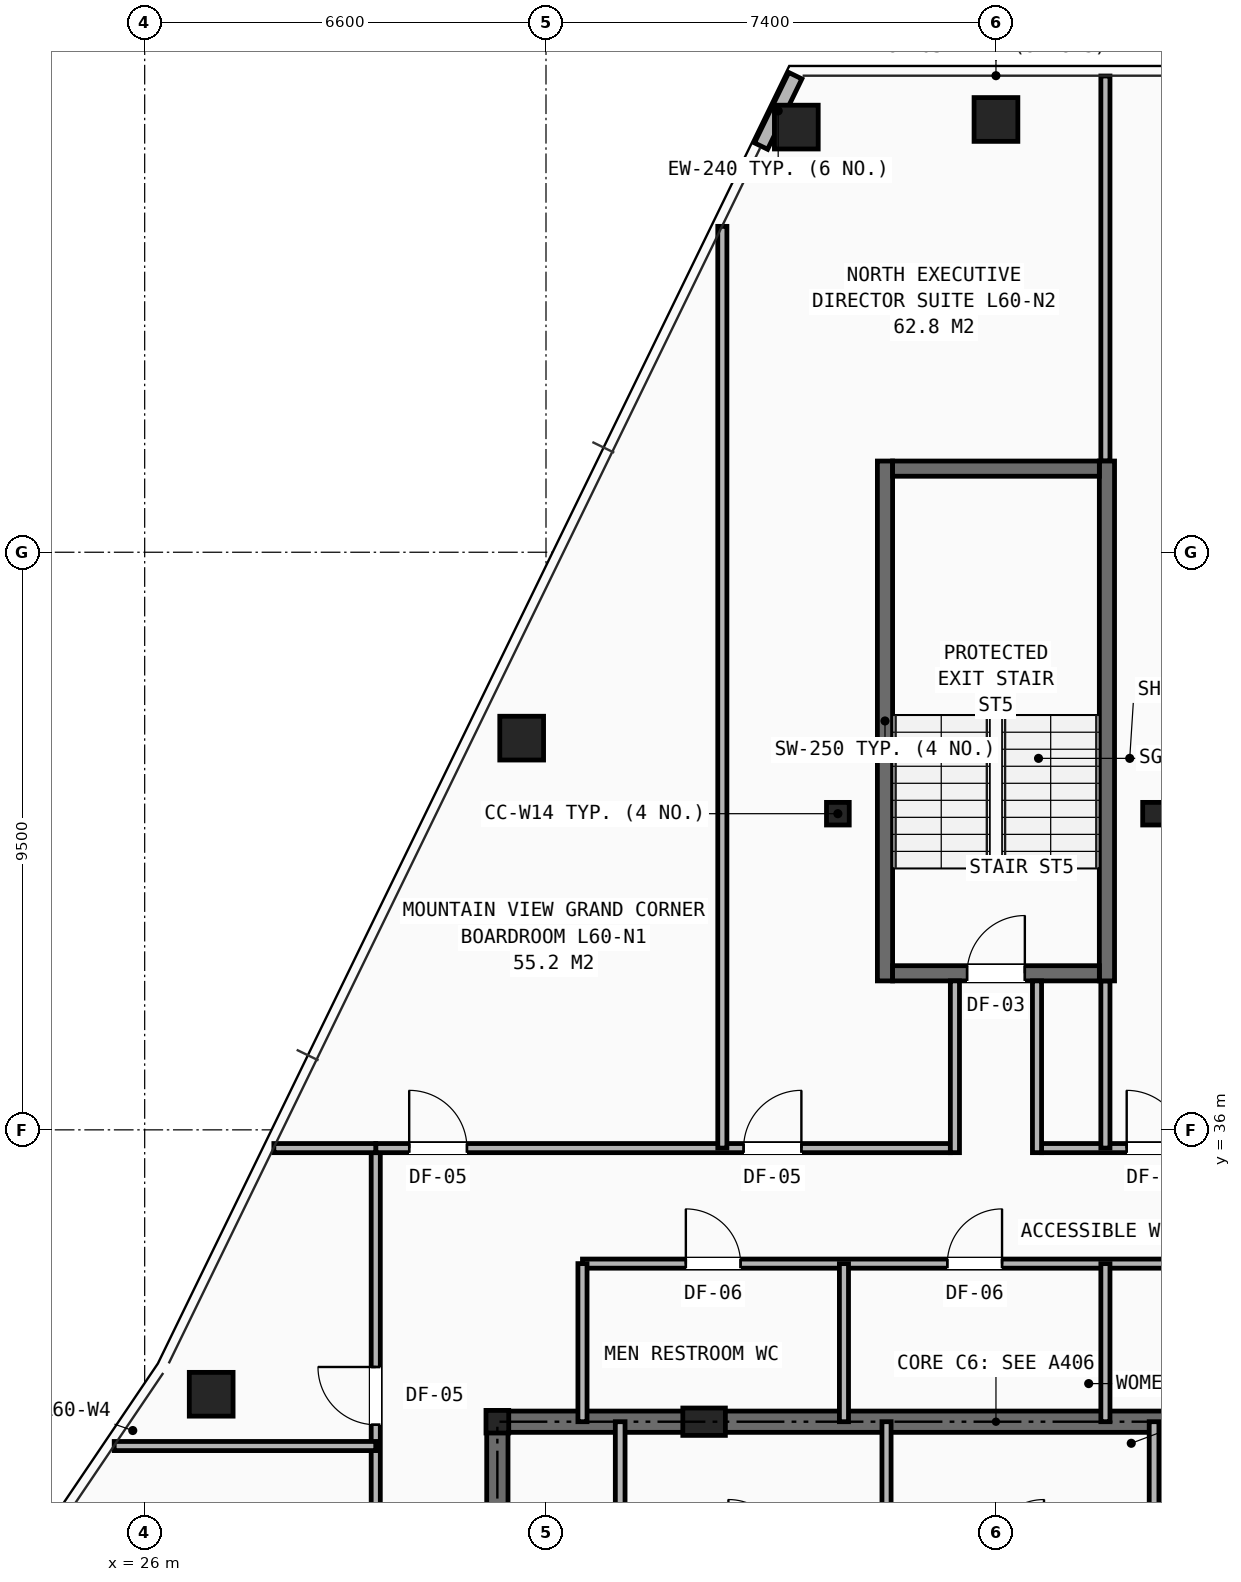
"""IFC4 building model, lengths in metres.
Left out: names, types, materials, properties, quantities, classifications, styles, units other than length and angle.
Written with IfcOpenShell. Run it as: python <this file> out.ifc"""

import sys

from ifc_helpers import new_model, si_unit, direction, frame, frame_2d, origin, origin_2d, place, context, subcontext, project, spatial, rectangle, hollow_rectangle, i_section, extrude, element, fill, save


model = new_model("IFC4")
c1 = context("Model", 3, precision=1e-05, world=origin(), true_north=direction((0.0, 1.0)))
c2 = subcontext(c1, "Body", "Model", "MODEL_VIEW")
j1 = project(units=[si_unit("LENGTHUNIT", "METRE"), si_unit("PLANEANGLEUNIT", "RADIAN")], contexts=[c1])
p1 = place(None, origin())
s1 = spatial("IfcSite", under=j1, at=p1, CompositionType="ELEMENT")
p2 = place(p1, origin())
s2 = spatial("IfcBuilding", under=s1, at=p2, CompositionType="ELEMENT")
p3 = place(p2, frame((0.0, 0.0, 211.9)))
s3 = spatial("IfcBuildingStorey", under=s2, at=p3, CompositionType="ELEMENT", Elevation=211.9)
for number, where, z_axis, x_axis in (
    (1, (31.8, 31.2, 0.0), (0.0, 0.0, 1.0), (1.0, 0.0, 0.0)),
    (2, (37.4, 41.2, 0.0), (0.0, 0.0, 1.0), (1.0, 0.0, 0.0)),
    (3, (42.6, 41.2, 0.0), (0.0, 0.0, 1.0), (1.0, 0.0, 0.0)),
):
    element("IfcColumn", number, at=place(p3, frame(where, z_axis=z_axis, x_axis=x_axis)), inside=s3, PredefinedType="COLUMN", context=c2, shape_type="SweptSolid", body=[
        extrude(i_section(OverallWidth=0.374, OverallDepth=0.372, WebThickness=0.016, FlangeThickness=0.026, at=origin_2d()), origin(), (0.0, 0.0, 1.0), 3.5),
    ])
p4 = place(p3, frame((35.2, 31.2, 0.0), z_axis=(0.0, 0.0, 1.0), x_axis=(1.0, 0.0, 0.0)))
e4 = element("IfcColumn", 4, at=p4, inside=s3, PredefinedType="PILASTER", context=c2, shape_type="SweptSolid", body=[
    extrude(rectangle(XDim=0.7, YDim=0.45, at=origin_2d()), origin(), (0.0, 0.0, 1.0), 3.5),
])
for number, where, z_axis, x_axis in (
    (5, (40.0, 52.618, 0.0), (0.0, 0.0, 1.0), (1.0, 0.0, 0.0)),
    (6, (36.717, 52.492, 0.0), (0.0, 0.0, 1.0), (1.0, 0.0, 0.0)),
    (7, (32.2, 42.443, 0.0), (0.0, 0.0, 1.0), (1.0, 0.0, 0.0)),
    (8, (27.094, 31.652, 0.0), (0.0, 0.0, 1.0), (1.0, 0.0, 0.0)),
):
    element("IfcColumn", number, at=place(p3, frame(where, z_axis=z_axis, x_axis=x_axis)), inside=s3, PredefinedType="COLUMN", context=c2, shape_type="SweptSolid", body=[
        extrude(hollow_rectangle(XDim=0.72, YDim=0.72, WallThickness=0.05, at=origin_2d()), origin(), (0.0, 0.0, 1.0), 3.5),
    ])
p5 = place(p3, frame((36.7, 53.338, 0.0), z_axis=(0.0, 0.0, 1.0), x_axis=(-0.43755686859, -0.899190739915, 0.0)))
e9 = element("IfcWall", 9, at=p5, inside=s3, PredefinedType="SHEAR", context=c2, shape_type="SweptSolid", body=[
    extrude(rectangle(XDim=1.288, YDim=0.24, at=frame_2d((0.644, 0.0))), origin(), (0.0, 0.0, 1.0), 2.623),
])
p6 = place(p3, frame((31.8, 31.2, 0.0), z_axis=(0.0, 0.0, 1.0), x_axis=(1.0, 0.0, 0.0)))
e10 = element("IfcWall", 10, at=p6, inside=s3, PredefinedType="SHEAR", context=c2, shape_type="SweptSolid", body=[
    extrude(rectangle(XDim=16.4, YDim=0.35, at=frame_2d((8.2, 0.0))), origin(), (0.0, 0.0, 1.0), 3.25),
])
p7 = place(p3, frame((31.8, 16.4, 0.0), z_axis=(0.0, 0.0, 1.0), x_axis=(0.0, 1.0, 0.0)))
e11 = element("IfcWall", 11, at=p7, inside=s3, PredefinedType="SHEAR", context=c2, shape_type="SweptSolid", body=[
    extrude(rectangle(XDim=14.8, YDim=0.35, at=frame_2d((7.4, 0.0))), origin(), (0.0, 0.0, 1.0), 3.25),
])
p8 = place(p7, frame((11.0, 0.0, 0.0)))
e12 = element("IfcOpeningElement", 12, at=p8, cuts=e11, PredefinedType="OPENING", context=c2, shape_type="SweptSolid", body=[
    extrude(rectangle(XDim=1.1, YDim=2.15, at=frame_2d((0.55, 1.075))), frame((0.0, 0.185, 0.0), z_axis=(0.0, -1.0, 0.0), x_axis=(1.0, 0.0, 0.0)), (0.0, 0.0, 1.0), 0.37),
])
p9 = place(p3, frame((33.82, 29.02, 0.0), z_axis=(0.0, 0.0, 1.0), x_axis=(0.0, 1.0, 0.0)))
e13 = element("IfcWall", 13, at=p9, inside=s3, PredefinedType="SOLIDWALL", context=c2, shape_type="SweptSolid", body=[
    extrude(rectangle(XDim=2.18, YDim=0.16, at=frame_2d((1.09, 0.0))), origin(), (0.0, 0.0, 1.0), 2.978),
])
p10 = place(p3, frame((38.2, 29.02, 0.0), z_axis=(0.0, 0.0, 1.0), x_axis=(0.0, 1.0, 0.0)))
e14 = element("IfcWall", 14, at=p10, inside=s3, PredefinedType="PARTITIONING", context=c2, shape_type="SweptSolid", body=[
    extrude(rectangle(XDim=2.18, YDim=0.15, at=frame_2d((1.09, 0.0))), origin(), (0.0, 0.0, 1.0), 2.978),
])
p11 = place(p3, frame((42.6, 29.02, 0.0), z_axis=(0.0, 0.0, 1.0), x_axis=(0.0, 1.0, 0.0)))
e15 = element("IfcWall", 15, at=p11, inside=s3, PredefinedType="SOLIDWALL", context=c2, shape_type="SweptSolid", body=[
    extrude(rectangle(XDim=2.18, YDim=0.16, at=frame_2d((1.09, 0.0))), origin(), (0.0, 0.0, 1.0), 2.978),
])
p12 = place(p3, frame((33.2, 33.8, 0.0), z_axis=(0.0, 0.0, 1.0), x_axis=(1.0, 0.0, 0.0)))
e16 = element("IfcWall", 16, at=p12, inside=s3, PredefinedType="PARTITIONING", context=c2, shape_type="SweptSolid", body=[
    extrude(rectangle(XDim=13.0, YDim=0.15, at=frame_2d((6.5, 0.0))), origin(), (0.0, 0.0, 1.0), 3.25),
])
p13 = place(p12, frame((1.7, 0.0, 0.0)))
e17 = element("IfcOpeningElement", 17, at=p13, cuts=e16, PredefinedType="OPENING", context=c2, shape_type="SweptSolid", body=[
    extrude(rectangle(XDim=0.9, YDim=2.1, at=frame_2d((0.45, 1.05))), frame((0.0, 0.085, 0.0), z_axis=(0.0, -1.0, 0.0), x_axis=(1.0, 0.0, 0.0)), (0.0, 0.0, 1.0), 0.17),
])
p14 = place(p12, frame((6.0, 0.0, 0.0)))
e18 = element("IfcOpeningElement", 18, at=p14, cuts=e16, PredefinedType="OPENING", context=c2, shape_type="SweptSolid", body=[
    extrude(rectangle(XDim=0.9, YDim=2.1, at=frame_2d((0.45, 1.05))), frame((0.0, 0.085, 0.0), z_axis=(0.0, -1.0, 0.0), x_axis=(1.0, 0.0, 0.0)), (0.0, 0.0, 1.0), 0.17),
])
p15 = place(p12, frame((10.35, 0.0, 0.0)))
e19 = element("IfcOpeningElement", 19, at=p15, cuts=e16, PredefinedType="OPENING", context=c2, shape_type="SweptSolid", body=[
    extrude(rectangle(XDim=0.9, YDim=2.1, at=frame_2d((0.45, 1.05))), frame((0.0, 0.085, 0.0), z_axis=(0.0, -1.0, 0.0), x_axis=(1.0, 0.0, 0.0)), (0.0, 0.0, 1.0), 0.17),
])
for number, where, z_axis, x_axis in (
    (20, (33.2, 31.2, 0.0), (0.0, 0.0, 1.0), (0.0, 1.0, 0.0)),
    (21, (37.5, 31.2, 0.0), (0.0, 0.0, 1.0), (0.0, 1.0, 0.0)),
    (22, (41.8, 31.2, 0.0), (0.0, 0.0, 1.0), (0.0, 1.0, 0.0)),
):
    element("IfcWall", number, at=place(p3, frame(where, z_axis=z_axis, x_axis=x_axis)), inside=s3, PredefinedType="PARTITIONING", context=c2, shape_type="SweptSolid", body=[
        extrude(rectangle(XDim=2.6, YDim=0.15, at=frame_2d((1.3, 0.0))), origin(), (0.0, 0.0, 1.0), 2.978),
    ])
p16 = place(p3, frame((29.8, 16.4, 0.0), z_axis=(0.0, 0.0, 1.0), x_axis=(0.0, 1.0, 0.0)))
e23 = element("IfcWall", 23, at=p16, inside=s3, PredefinedType="PARTITIONING", context=c2, shape_type="SweptSolid", body=[
    extrude(rectangle(XDim=19.3, YDim=0.15, at=frame_2d((9.65, 0.0))), origin(), (0.0, 0.0, 1.0), 2.265),
])
p17 = place(p16, frame((0.35, 0.0, 0.0)))
e24 = element("IfcOpeningElement", 24, at=p17, cuts=e23, PredefinedType="OPENING", context=c2, shape_type="SweptSolid", body=[
    extrude(rectangle(XDim=0.95, YDim=2.1, at=frame_2d((0.475, 1.05))), frame((0.0, 0.085, 0.0), z_axis=(0.0, -1.0, 0.0), x_axis=(1.0, 0.0, 0.0)), (0.0, 0.0, 1.0), 0.17),
])
p18 = place(p16, frame((4.45, 0.0, 0.0)))
e25 = element("IfcOpeningElement", 25, at=p18, cuts=e23, PredefinedType="OPENING", context=c2, shape_type="SweptSolid", body=[
    extrude(rectangle(XDim=0.95, YDim=2.1, at=frame_2d((0.475, 1.05))), frame((0.0, 0.085, 0.0), z_axis=(0.0, -1.0, 0.0), x_axis=(1.0, 0.0, 0.0)), (0.0, 0.0, 1.0), 0.17),
])
p19 = place(p16, frame((9.45, 0.0, 0.0)))
e26 = element("IfcOpeningElement", 26, at=p19, cuts=e23, PredefinedType="OPENING", context=c2, shape_type="SweptSolid", body=[
    extrude(rectangle(XDim=0.95, YDim=2.1, at=frame_2d((0.475, 1.05))), frame((0.0, 0.085, 0.0), z_axis=(0.0, -1.0, 0.0), x_axis=(1.0, 0.0, 0.0)), (0.0, 0.0, 1.0), 0.17),
])
p20 = place(p16, frame((14.75, 0.0, 0.0)))
e27 = element("IfcOpeningElement", 27, at=p20, cuts=e23, PredefinedType="OPENING", context=c2, shape_type="SweptSolid", body=[
    extrude(rectangle(XDim=0.95, YDim=2.1, at=frame_2d((0.475, 1.05))), frame((0.0, 0.085, 0.0), z_axis=(0.0, -1.0, 0.0), x_axis=(1.0, 0.0, 0.0)), (0.0, 0.0, 1.0), 0.17),
])
p21 = place(p3, frame((29.8, 35.7, 0.0), z_axis=(0.0, 0.0, 1.0), x_axis=(1.0, 0.0, 0.0)))
e28 = element("IfcWall", 28, at=p21, inside=s3, PredefinedType="PARTITIONING", context=c2, shape_type="SweptSolid", body=[
    extrude(rectangle(XDim=9.45, YDim=0.15, at=frame_2d((4.725, 0.0))), origin(), (0.0, 0.0, 1.0), 2.833),
])
p22 = place(p21, frame((0.55, 0.0, 0.0)))
e29 = element("IfcOpeningElement", 29, at=p22, cuts=e28, PredefinedType="OPENING", context=c2, shape_type="SweptSolid", body=[
    extrude(rectangle(XDim=0.95, YDim=2.1, at=frame_2d((0.475, 1.05))), frame((0.0, 0.085, 0.0), z_axis=(0.0, -1.0, 0.0), x_axis=(1.0, 0.0, 0.0)), (0.0, 0.0, 1.0), 0.17),
])
p23 = place(p21, frame((6.05, 0.0, 0.0)))
e30 = element("IfcOpeningElement", 30, at=p23, cuts=e28, PredefinedType="OPENING", context=c2, shape_type="SweptSolid", body=[
    extrude(rectangle(XDim=0.95, YDim=2.1, at=frame_2d((0.475, 1.05))), frame((0.0, 0.085, 0.0), z_axis=(0.0, -1.0, 0.0), x_axis=(1.0, 0.0, 0.0)), (0.0, 0.0, 1.0), 0.17),
])
p24 = place(p3, frame((40.75, 35.7, 0.0), z_axis=(0.0, 0.0, 1.0), x_axis=(1.0, 0.0, 0.0)))
e31 = element("IfcWall", 31, at=p24, inside=s3, PredefinedType="PARTITIONING", context=c2, shape_type="SweptSolid", body=[
    extrude(rectangle(XDim=6.05, YDim=0.15, at=frame_2d((3.025, 0.0))), origin(), (0.0, 0.0, 1.0), 3.25),
])
p25 = place(p24, frame((1.4, 0.0, 0.0)))
e32 = element("IfcOpeningElement", 32, at=p25, cuts=e31, PredefinedType="OPENING", context=c2, shape_type="SweptSolid", body=[
    extrude(rectangle(XDim=0.95, YDim=2.1, at=frame_2d((0.475, 1.05))), frame((0.0, 0.085, 0.0), z_axis=(0.0, -1.0, 0.0), x_axis=(1.0, 0.0, 0.0)), (0.0, 0.0, 1.0), 0.17),
])
p26 = place(p3, frame((28.124, 35.7, 0.0), z_axis=(0.0, 0.0, 1.0), x_axis=(1.0, 0.0, 0.0)))
e33 = element("IfcWall", 33, at=p26, inside=s3, PredefinedType="PARTITIONING", context=c2, shape_type="SweptSolid", body=[
    extrude(rectangle(XDim=1.676, YDim=0.15, at=frame_2d((0.838, 0.0))), origin(), (0.0, 0.0, 1.0), 2.628),
])
p27 = place(p3, frame((25.499, 30.8, 0.0), z_axis=(0.0, 0.0, 1.0), x_axis=(1.0, 0.0, 0.0)))
e34 = element("IfcWall", 34, at=p27, inside=s3, PredefinedType="PARTITIONING", context=c2, shape_type="SweptSolid", body=[
    extrude(rectangle(XDim=4.301, YDim=0.15, at=frame_2d((2.151, 0.0))), origin(), (0.0, 0.0, 1.0), 2.628),
])
p28 = place(p3, frame((35.5, 35.7, 0.0), z_axis=(0.0, 0.0, 1.0), x_axis=(0.0, 1.0, 0.0)))
e35 = element("IfcWall", 35, at=p28, inside=s3, PredefinedType="PARTITIONING", context=c2, shape_type="SweptSolid", body=[
    extrude(rectangle(XDim=15.16, YDim=0.15, at=frame_2d((7.58, 0.0))), origin(), (0.0, 0.0, 1.0), 2.265),
])
p29 = place(p3, frame((41.8, 35.7, 0.0), z_axis=(0.0, 0.0, 1.0), x_axis=(0.0, 1.0, 0.0)))
e36 = element("IfcWall", 36, at=p29, inside=s3, PredefinedType="PARTITIONING", context=c2, shape_type="SweptSolid", body=[
    extrude(rectangle(XDim=2.75, YDim=0.15, at=frame_2d((1.375, 0.0))), origin(), (0.0, 0.0, 1.0), 3.25),
])
p30 = place(p3, frame((41.8, 47.0, 0.0), z_axis=(0.0, 0.0, 1.0), x_axis=(0.0, 1.0, 0.0)))
e37 = element("IfcWall", 37, at=p30, inside=s3, PredefinedType="PARTITIONING", context=c2, shape_type="SweptSolid", body=[
    extrude(rectangle(XDim=6.333, YDim=0.15, at=frame_2d((3.167, 0.0))), origin(), (0.0, 0.0, 1.0), 2.628),
])
for number, where, z_axis, x_axis in (
    (38, (38.175, 38.45, 0.0), (0.0, 0.0, 1.0), (0.0, 1.0, 0.0)),
    (39, (41.825, 38.45, 0.0), (0.0, 0.0, 1.0), (0.0, 1.0, 0.0)),
):
    element("IfcWall", number, at=place(p3, frame(where, z_axis=z_axis, x_axis=x_axis)), inside=s3, PredefinedType="SHEAR", context=c2, shape_type="SweptSolid", body=[
        extrude(rectangle(XDim=8.55, YDim=0.25, at=frame_2d((4.275, 0.0))), origin(), (0.0, 0.0, 1.0), 3.25),
    ])
p31 = place(p3, frame((38.3, 38.575, 0.0), z_axis=(0.0, 0.0, 1.0), x_axis=(1.0, 0.0, 0.0)))
e40 = element("IfcWall", 40, at=p31, inside=s3, PredefinedType="SHEAR", context=c2, shape_type="SweptSolid", body=[
    extrude(rectangle(XDim=3.4, YDim=0.25, at=frame_2d((1.7, 0.0))), origin(), (0.0, 0.0, 1.0), 3.25),
])
p32 = place(p31, frame((1.225, 0.0, 0.0)))
e41 = element("IfcOpeningElement", 41, at=p32, cuts=e40, PredefinedType="OPENING", context=c2, shape_type="SweptSolid", body=[
    extrude(rectangle(XDim=0.95, YDim=2.1, at=frame_2d((0.475, 1.05))), frame((0.0, 0.135, 0.0), z_axis=(0.0, -1.0, 0.0), x_axis=(1.0, 0.0, 0.0)), (0.0, 0.0, 1.0), 0.27),
])
p33 = place(p3, frame((38.3, 46.875, 0.0), z_axis=(0.0, 0.0, 1.0), x_axis=(1.0, 0.0, 0.0)))
e42 = element("IfcWall", 42, at=p33, inside=s3, PredefinedType="SHEAR", context=c2, shape_type="SweptSolid", body=[
    extrude(rectangle(XDim=3.4, YDim=0.25, at=frame_2d((1.7, 0.0))), origin(), (0.0, 0.0, 1.0), 3.25),
])
for number, where, z_axis, x_axis in (
    (43, (39.325, 35.625, 0.0), (0.0, 0.0, 1.0), (0.0, 1.0, 0.0)),
    (44, (40.675, 35.625, 0.0), (0.0, 0.0, 1.0), (0.0, 1.0, 0.0)),
):
    element("IfcWall", number, at=place(p3, frame(where, z_axis=z_axis, x_axis=x_axis)), inside=s3, PredefinedType="PARTITIONING", context=c2, shape_type="SweptSolid", body=[
        extrude(rectangle(XDim=2.825, YDim=0.15, at=frame_2d((1.413, 0.0))), origin(), (0.0, 0.0, 1.0), 3.25),
    ])
p34 = place(p13, origin())
e45 = element("IfcDoor", 45, at=p34, inside=s3, OperationType="SINGLE_SWING_LEFT", PredefinedType="DOOR", context=c2, shape_type="SweptSolid", body=[
    extrude(rectangle(XDim=0.9, YDim=2.1, at=frame_2d((0.45, 1.05))), frame((0.0, 0.025, 0.0), z_axis=(0.0, -1.0, 0.0), x_axis=(1.0, 0.0, 0.0)), (0.0, 0.0, 1.0), 0.05),
])
fill(e17, e45)
p35 = place(p14, origin())
e46 = element("IfcDoor", 46, at=p35, inside=s3, OperationType="SINGLE_SWING_RIGHT", PredefinedType="DOOR", context=c2, shape_type="SweptSolid", body=[
    extrude(rectangle(XDim=0.9, YDim=2.1, at=frame_2d((0.45, 1.05))), frame((0.0, 0.025, 0.0), z_axis=(0.0, -1.0, 0.0), x_axis=(1.0, 0.0, 0.0)), (0.0, 0.0, 1.0), 0.05),
])
fill(e18, e46)
p36 = place(p20, origin())
e47 = element("IfcDoor", 47, at=p36, inside=s3, OperationType="SINGLE_SWING_RIGHT", PredefinedType="DOOR", context=c2, shape_type="SweptSolid", body=[
    extrude(rectangle(XDim=0.95, YDim=2.1, at=frame_2d((0.475, 1.05))), frame((0.0, 0.025, 0.0), z_axis=(0.0, -1.0, 0.0), x_axis=(1.0, 0.0, 0.0)), (0.0, 0.0, 1.0), 0.05),
])
fill(e27, e47)
p37 = place(p22, origin())
e48 = element("IfcDoor", 48, at=p37, inside=s3, OperationType="SINGLE_SWING_LEFT", PredefinedType="DOOR", context=c2, shape_type="SweptSolid", body=[
    extrude(rectangle(XDim=0.95, YDim=2.1, at=frame_2d((0.475, 1.05))), frame((0.0, 0.025, 0.0), z_axis=(0.0, -1.0, 0.0), x_axis=(1.0, 0.0, 0.0)), (0.0, 0.0, 1.0), 0.05),
])
fill(e29, e48)
p38 = place(p23, origin())
e49 = element("IfcDoor", 49, at=p38, inside=s3, OperationType="SINGLE_SWING_RIGHT", PredefinedType="DOOR", context=c2, shape_type="SweptSolid", body=[
    extrude(rectangle(XDim=0.95, YDim=2.1, at=frame_2d((0.475, 1.05))), frame((0.0, 0.025, 0.0), z_axis=(0.0, -1.0, 0.0), x_axis=(1.0, 0.0, 0.0)), (0.0, 0.0, 1.0), 0.05),
])
fill(e30, e49)
p39 = place(p25, origin())
e50 = element("IfcDoor", 50, at=p39, inside=s3, OperationType="SINGLE_SWING_LEFT", PredefinedType="DOOR", context=c2, shape_type="SweptSolid", body=[
    extrude(rectangle(XDim=0.95, YDim=2.1, at=frame_2d((0.475, 1.05))), frame((0.0, 0.025, 0.0), z_axis=(0.0, -1.0, 0.0), x_axis=(1.0, 0.0, 0.0)), (0.0, 0.0, 1.0), 0.05),
])
fill(e32, e50)
p40 = place(p32, origin())
e51 = element("IfcDoor", 51, at=p40, inside=s3, OperationType="SINGLE_SWING_RIGHT", PredefinedType="DOOR", context=c2, shape_type="SweptSolid", body=[
    extrude(rectangle(XDim=0.95, YDim=2.1, at=frame_2d((0.475, 1.05))), frame((0.0, 0.025, 0.0), z_axis=(0.0, -1.0, 0.0), x_axis=(1.0, 0.0, 0.0)), (0.0, 0.0, 1.0), 0.05),
])
fill(e41, e51)
save(model, sys.argv[1])
